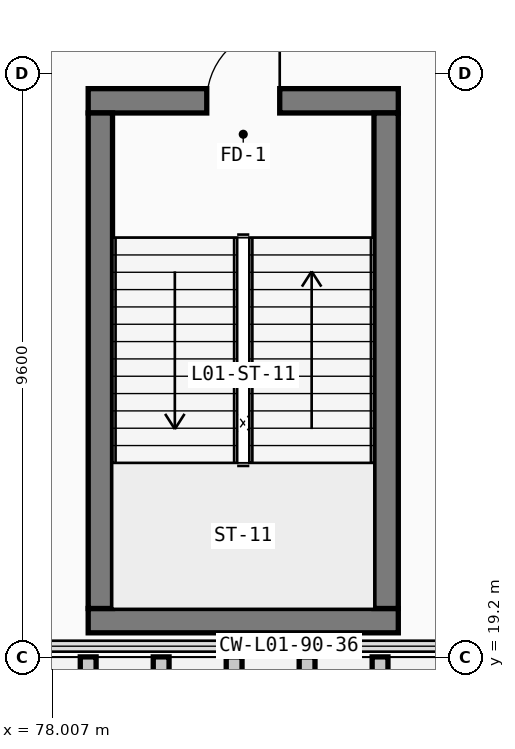
"""IFC4 building model, lengths in metres.
Left out: names, types, materials, properties, quantities, classifications, styles, units other than length and angle.
Written with IfcOpenShell. Run it as: python <this file> out.ifc"""

import sys

from ifc_helpers import new_model, si_unit, direction, frame, frame_2d, origin, place, context, subcontext, project, spatial, rectangle, extrude, element, fill, save


model = new_model("IFC4")
c1 = context("Model", 3, precision=1e-05, world=origin(), true_north=direction((0.0, 1.0)))
c2 = subcontext(c1, "Body", "Model", "MODEL_VIEW")
j1 = project(units=[si_unit("LENGTHUNIT", "METRE"), si_unit("PLANEANGLEUNIT", "RADIAN")], contexts=[c1])
p1 = place(None, origin())
s1 = spatial("IfcSite", under=j1, at=p1, CompositionType="ELEMENT")
p2 = place(p1, origin())
s2 = spatial("IfcBuilding", under=s1, at=p2, CompositionType="ELEMENT")
p3 = place(p2, frame((0.0, 0.0, 4.8)))
s3 = spatial("IfcBuildingStorey", under=s2, at=p3, CompositionType="ELEMENT", Elevation=4.8)
p4 = place(p3, frame((78.6, 19.8, 0.0), z_axis=(0.0, 0.0, 1.0), x_axis=(1.0, 0.0, 0.0)))
e1 = element("IfcWall", 1, at=p4, inside=s3, PredefinedType="SHEAR", context=c2, shape_type="SweptSolid", body=[
    extrude(rectangle(XDim=5.1, YDim=0.4, at=frame_2d((2.55, 0.0))), origin(), (0.0, 0.0, 1.0), 4.52),
])
p5 = place(p3, frame((83.7, 28.35, 0.0), z_axis=(0.0, 0.0, 1.0), x_axis=(-1.0, 0.0, 0.0)))
e2 = element("IfcWall", 2, at=p5, inside=s3, PredefinedType="SHEAR", context=c2, shape_type="SweptSolid", body=[
    extrude(rectangle(XDim=5.1, YDim=0.4, at=frame_2d((2.55, 0.0))), origin(), (0.0, 0.0, 1.0), 4.52),
])
p6 = place(p5, frame((3.15, 0.0, 0.0), z_axis=(0.0, 0.0, 1.0), x_axis=(-1.0, 0.0, 0.0)))
e3 = element("IfcOpeningElement", 3, at=p6, cuts=e2, PredefinedType="OPENING", context=c2, shape_type="SweptSolid", body=[
    extrude(rectangle(XDim=1.2, YDim=2.2, at=frame_2d((0.6, 1.1))), frame((0.0, 0.21, 0.0), z_axis=(0.0, -1.0, 0.0), x_axis=(1.0, 0.0, 0.0)), (0.0, 0.0, 1.0), 0.42),
])
for number, where, z_axis, x_axis in (
    (4, (78.8, 28.15, 0.0), (0.0, 0.0, 1.0), (0.0, -1.0, 0.0)),
    (5, (83.5, 20.0, 0.0), (0.0, 0.0, 1.0), (0.0, 1.0, 0.0)),
):
    element("IfcWall", number, at=place(p3, frame(where, z_axis=z_axis, x_axis=x_axis)), inside=s3, PredefinedType="SHEAR", context=c2, shape_type="SweptSolid", body=[
        extrude(rectangle(XDim=8.15, YDim=0.4, at=frame_2d((4.075, 0.0))), origin(), (0.0, 0.0, 1.0), 4.52),
    ])
p7 = place(p6, origin())
e6 = element("IfcDoor", 6, at=p7, inside=s3, OperationType="SINGLE_SWING_RIGHT", PredefinedType="DOOR", context=c2, shape_type="SweptSolid", body=[
    extrude(rectangle(XDim=1.2, YDim=2.2, at=frame_2d((0.6, 1.1))), frame((0.0, 0.025, 0.0), z_axis=(0.0, -1.0, 0.0), x_axis=(1.0, 0.0, 0.0)), (0.0, 0.0, 1.0), 0.05),
])
fill(e3, e6)
save(model, sys.argv[1])
